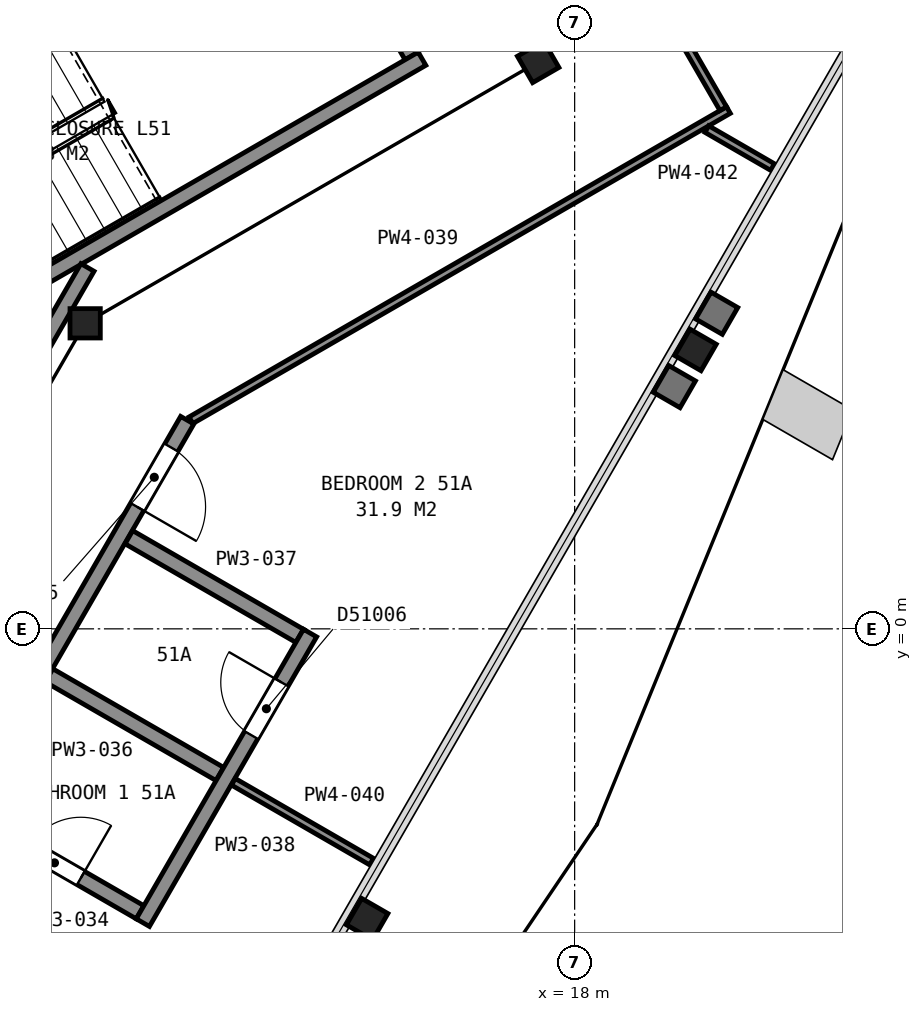
"""IFC4 building model, lengths in metres.
Left out: names, types, materials, properties, quantities, classifications, styles, units other than length and angle.
Written with IfcOpenShell. Run it as: python <this file> out.ifc"""

import sys

from ifc_helpers import new_model, si_unit, direction, frame, frame_2d, origin, origin_2d, place, context, subcontext, project, spatial, rectangle, i_section, extrude, element, fill, save


model = new_model("IFC4")
c1 = context("Model", 3, precision=1e-05, world=origin(), true_north=direction((0.0, 1.0)))
c2 = subcontext(c1, "Body", "Model", "MODEL_VIEW")
j1 = project(units=[si_unit("LENGTHUNIT", "METRE"), si_unit("PLANEANGLEUNIT", "RADIAN")], contexts=[c1])
p1 = place(None, origin())
s1 = spatial("IfcSite", under=j1, at=p1, CompositionType="ELEMENT")
p2 = place(p1, origin())
s2 = spatial("IfcBuilding", under=s1, at=p2, CompositionType="ELEMENT")
p3 = place(p2, frame((0.0, 0.0, 206.4)))
s3 = spatial("IfcBuildingStorey", under=s2, at=p3, CompositionType="ELEMENT", Elevation=206.4)
for number, where, z_axis, x_axis in (
    (1, (15.27, -3.82, 0.0), (0.0, 0.0, 1.0), (-0.5, -0.866, 0.0)),
    (2, (19.59, 3.67, 0.0), (0.0, 0.0, 1.0), (-0.5, -0.866, 0.0)),
):
    element("IfcColumn", number, at=place(p3, frame(where, z_axis=z_axis, x_axis=x_axis)), inside=s3, PredefinedType="COLUMN", context=c2, shape_type="SweptSolid", body=[
        extrude(i_section(OverallWidth=0.401, OverallDepth=0.399, WebThickness=0.025, FlangeThickness=0.04, FilletRadius=0.015, at=origin_2d()), origin(), (0.0, 0.0, 1.0), 3.7),
    ])
p4 = place(p3, frame((11.56, 4.02, 0.0), z_axis=(0.0, 0.0, 1.0), x_axis=(1.0, 0.0, 0.0)))
e3 = element("IfcColumn", 3, at=p4, inside=s3, PredefinedType="COLUMN", context=c2, shape_type="SweptSolid", body=[
    extrude(i_section(OverallWidth=0.399, OverallDepth=0.386, WebThickness=0.021, FlangeThickness=0.033, FilletRadius=0.015, at=origin_2d()), origin(), (0.0, 0.0, 1.0), 3.7),
])
p5 = place(p3, frame((17.52, 7.46, 0.0), z_axis=(0.0, 0.0, 1.0), x_axis=(0.5, -0.866025403784, 0.0)))
e4 = element("IfcColumn", 4, at=p5, inside=s3, PredefinedType="COLUMN", context=c2, shape_type="SweptSolid", body=[
    extrude(i_section(OverallWidth=0.401, OverallDepth=0.399, WebThickness=0.025, FlangeThickness=0.04, FilletRadius=0.015, at=origin_2d()), origin(), (0.0, 0.0, 1.0), 3.7),
])
p6 = place(p3, frame((15.855, 7.538, 0.0), z_axis=(0.0, 0.0, 1.0), x_axis=(-0.500049511043, 0.865996816683, 0.0)))
e5 = element("IfcWall", 5, at=p6, inside=s3, PredefinedType="PARTITIONING", context=c2, shape_type="SweptSolid", body=[
    extrude(rectangle(XDim=2.8, YDim=0.2, at=frame_2d((1.4, 0.0))), origin(), (0.0, 0.0, 1.0), 3.45),
])
p7 = place(p6, frame((0.85, 0.0, 0.0)))
e6 = element("IfcOpeningElement", 6, at=p7, cuts=e5, PredefinedType="OPENING", context=c2, shape_type="SweptSolid", body=[
    extrude(rectangle(XDim=1.1, YDim=2.1, at=frame_2d((0.55, 1.05))), frame((0.0, 0.11, 0.0), z_axis=(0.0, -1.0, 0.0), x_axis=(1.0, 0.0, 0.0)), (0.0, 0.0, 1.0), 0.22),
])
for number, where, z_axis, x_axis in (
    (7, (6.178, 5.299, 0.0), (0.0, 0.0, 1.0), (0.866, 0.5, 0.0)),
    (8, (7.678, 2.701, 0.0), (0.0, 0.0, 1.0), (0.866, 0.5, 0.0)),
):
    element("IfcWall", number, at=place(p3, frame(where, z_axis=z_axis, x_axis=x_axis)), inside=s3, PredefinedType="PARTITIONING", context=c2, shape_type="SweptSolid", body=[
        extrude(rectangle(XDim=9.6, YDim=0.2, at=frame_2d((4.8, 0.0))), origin(), (0.0, 0.0, 1.0), 3.45),
    ])
p8 = place(p3, frame((9.803, 1.658, 0.0), z_axis=(0.0, 0.0, 1.0), x_axis=(0.499943114462, 0.866058244174, 0.0)))
e9 = element("IfcWall", 9, at=p8, inside=s3, PredefinedType="PARTITIONING", context=c2, shape_type="SweptSolid", body=[
    extrude(rectangle(XDim=3.576, YDim=0.2, at=frame_2d((1.788, 0.0))), origin(), (0.0, 0.0, 1.0), 3.45),
])
p9 = place(p3, frame((12.903, 2.745, 0.0), z_axis=(0.0, 0.0, 1.0), x_axis=(-0.499999743747, -0.866025551732, 0.0)))
e10 = element("IfcWall", 10, at=p9, inside=s3, PredefinedType="PARTITIONING", context=c2, shape_type="SweptSolid", body=[
    extrude(rectangle(XDim=17.656, YDim=0.2, at=frame_2d((8.828, 0.0))), origin(), (0.0, 0.0, 1.0), 2.713),
])
p10 = place(p9, frame((12.756, 0.0, 0.0)))
e11 = element("IfcOpeningElement", 11, at=p10, cuts=e10, PredefinedType="OPENING", context=c2, shape_type="SweptSolid", body=[
    extrude(rectangle(XDim=1.2, YDim=2.1, at=frame_2d((0.6, 1.05))), frame((0.0, 0.11, 0.0), z_axis=(0.0, -1.0, 0.0), x_axis=(1.0, 0.0, 0.0)), (0.0, 0.0, 1.0), 0.22),
])
p11 = place(p9, frame((7.044, 0.0, 0.0)))
e12 = element("IfcOpeningElement", 12, at=p11, cuts=e10, PredefinedType="OPENING", context=c2, shape_type="SweptSolid", body=[
    extrude(rectangle(XDim=0.9, YDim=2.1, at=frame_2d((0.45, 1.05))), frame((0.0, 0.11, 0.0), z_axis=(0.0, -1.0, 0.0), x_axis=(1.0, 0.0, 0.0)), (0.0, 0.0, 1.0), 0.22),
])
p12 = place(p9, frame((0.417, 0.0, 0.0)))
e13 = element("IfcOpeningElement", 13, at=p12, cuts=e10, PredefinedType="OPENING", context=c2, shape_type="SweptSolid", body=[
    extrude(rectangle(XDim=0.9, YDim=2.1, at=frame_2d((0.45, 1.05))), frame((0.0, 0.11, 0.0), z_axis=(0.0, -1.0, 0.0), x_axis=(1.0, 0.0, 0.0)), (0.0, 0.0, 1.0), 0.22),
])
p13 = place(p3, frame((10.035, -2.431, 0.0), z_axis=(0.0, 0.0, 1.0), x_axis=(0.866028930478, -0.499993891537, 0.0)))
e14 = element("IfcWall", 14, at=p13, inside=s3, PredefinedType="PARTITIONING", context=c2, shape_type="SweptSolid", body=[
    extrude(rectangle(XDim=2.595, YDim=0.2, at=frame_2d((1.298, 0.0))), origin(), (0.0, 0.0, 1.0), 2.713),
])
p14 = place(p13, frame((0.895, 0.0, 0.0)))
e15 = element("IfcOpeningElement", 15, at=p14, cuts=e14, PredefinedType="OPENING", context=c2, shape_type="SweptSolid", body=[
    extrude(rectangle(XDim=0.8, YDim=2.1, at=frame_2d((0.4, 1.05))), frame((0.0, 0.11, 0.0), z_axis=(0.0, -1.0, 0.0), x_axis=(1.0, 0.0, 0.0)), (0.0, 0.0, 1.0), 0.22),
])
for number, where, z_axis, x_axis in (
    (16, (11.085, -0.613, 0.0), (0.0, 0.0, 1.0), (0.866, -0.5, 0.0)),
    (17, (12.135, 1.206, 0.0), (0.0, 0.0, 1.0), (0.866, -0.5, 0.0)),
):
    element("IfcWall", number, at=place(p3, frame(where, z_axis=z_axis, x_axis=x_axis)), inside=s3, PredefinedType="PARTITIONING", context=c2, shape_type="SweptSolid", body=[
        extrude(rectangle(XDim=2.595, YDim=0.2, at=frame_2d((1.297, 0.0))), origin(), (0.0, 0.0, 1.0), 2.713),
    ])
p15 = place(p3, frame((12.319, -3.866, 0.0), z_axis=(0.0, 0.0, 1.0), x_axis=(0.50001224981, 0.866018331238, 0.0)))
e18 = element("IfcWall", 18, at=p15, inside=s3, PredefinedType="PARTITIONING", context=c2, shape_type="SweptSolid", body=[
    extrude(rectangle(XDim=4.4, YDim=0.2, at=frame_2d((2.2, 0.0))), origin(), (0.0, 0.0, 1.0), 2.713),
])
p16 = place(p15, frame((2.85, 0.0, 0.0)))
e19 = element("IfcOpeningElement", 19, at=p16, cuts=e18, PredefinedType="OPENING", context=c2, shape_type="SweptSolid", body=[
    extrude(rectangle(XDim=0.8, YDim=2.1, at=frame_2d((0.4, 1.05))), frame((0.0, 0.11, 0.0), z_axis=(0.0, -1.0, 0.0), x_axis=(1.0, 0.0, 0.0)), (0.0, 0.0, 1.0), 0.22),
])
p17 = place(p3, frame((12.952, 2.744, 0.0), z_axis=(0.0, 0.0, 1.0), x_axis=(0.86608949446, 0.499888975259, 0.0)))
e20 = element("IfcWall", 20, at=p17, inside=s3, PredefinedType="PARTITIONING", context=c2, shape_type="SweptSolid", body=[
    extrude(rectangle(XDim=8.165, YDim=0.1, at=frame_2d((4.083, 0.0))), origin(), (0.0, 0.0, 1.0), 2.713),
])
p18 = place(p3, frame((13.51, -2.012, 0.0), z_axis=(0.0, 0.0, 1.0), x_axis=(0.866022890907, -0.500004352405, 0.0)))
e21 = element("IfcWall", 21, at=p18, inside=s3, PredefinedType="PARTITIONING", context=c2, shape_type="SweptSolid", body=[
    extrude(rectangle(XDim=2.099, YDim=0.1, at=frame_2d((1.05, 0.0))), origin(), (0.0, 0.0, 1.0), 2.713),
])
p19 = place(p3, frame((15.928, 13.812, 0.0), z_axis=(0.0, 0.0, 1.0), x_axis=(0.500422653123, -0.865781247337, 0.0)))
e22 = element("IfcWall", 22, at=p19, inside=s3, PredefinedType="PARTITIONING", context=c2, shape_type="SweptSolid", body=[
    extrude(rectangle(XDim=8.047, YDim=0.1, at=frame_2d((4.024, 0.0))), origin(), (0.0, 0.0, 1.0), 2.713),
])
p20 = place(p19, frame((3.55, 0.0, 0.0)))
e23 = element("IfcOpeningElement", 23, at=p20, cuts=e22, PredefinedType="OPENING", context=c2, shape_type="SweptSolid", body=[
    extrude(rectangle(XDim=0.9, YDim=2.1, at=frame_2d((0.45, 1.05))), frame((0.0, 0.06, 0.0), z_axis=(0.0, -1.0, 0.0), x_axis=(1.0, 0.0, 0.0)), (0.0, 0.0, 1.0), 0.12),
])
p21 = place(p3, frame((19.739, 6.576, 0.0), z_axis=(0.0, 0.0, 1.0), x_axis=(0.865855657918, -0.500293893279, 0.0)))
e24 = element("IfcWall", 24, at=p21, inside=s3, PredefinedType="PARTITIONING", context=c2, shape_type="SweptSolid", body=[
    extrude(rectangle(XDim=0.999, YDim=0.1, at=frame_2d((0.499, 0.0))), origin(), (0.0, 0.0, 1.0), 2.713),
])
p22 = place(p12, origin())
e25 = element("IfcDoor", 25, at=p22, inside=s3, OperationType="SINGLE_SWING_RIGHT", PredefinedType="DOOR", context=c2, shape_type="SweptSolid", body=[
    extrude(rectangle(XDim=0.9, YDim=2.1, at=frame_2d((0.45, 1.05))), frame((0.0, 0.025, 0.0), z_axis=(0.0, -1.0, 0.0), x_axis=(1.0, 0.0, 0.0)), (0.0, 0.0, 1.0), 0.05),
])
fill(e13, e25)
p23 = place(p14, origin())
e26 = element("IfcDoor", 26, at=p23, inside=s3, OperationType="SINGLE_SWING_RIGHT", PredefinedType="DOOR", context=c2, shape_type="SweptSolid", body=[
    extrude(rectangle(XDim=0.8, YDim=2.1, at=frame_2d((0.4, 1.05))), frame((0.0, 0.025, 0.0), z_axis=(0.0, -1.0, 0.0), x_axis=(1.0, 0.0, 0.0)), (0.0, 0.0, 1.0), 0.05),
])
fill(e15, e26)
p24 = place(p16, origin())
e27 = element("IfcDoor", 27, at=p24, inside=s3, OperationType="SINGLE_SWING_RIGHT", PredefinedType="DOOR", context=c2, shape_type="SweptSolid", body=[
    extrude(rectangle(XDim=0.8, YDim=2.1, at=frame_2d((0.4, 1.05))), frame((0.0, 0.025, 0.0), z_axis=(0.0, -1.0, 0.0), x_axis=(1.0, 0.0, 0.0)), (0.0, 0.0, 1.0), 0.05),
])
fill(e19, e27)
save(model, sys.argv[1])
